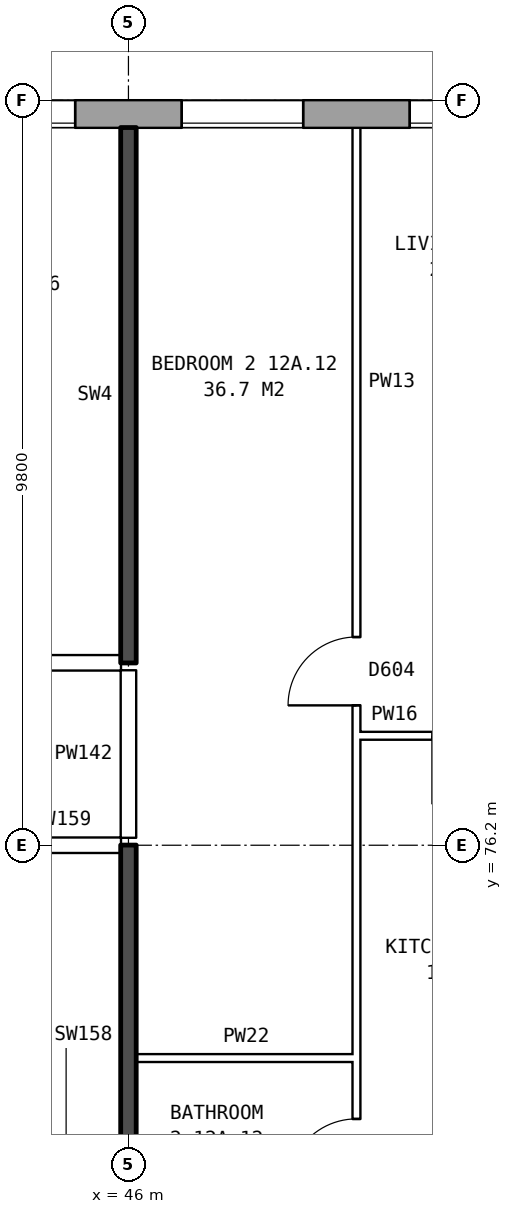
"""IFC4 building model, lengths in metres.
Left out: names, types, materials, properties, quantities, classifications, styles, units other than length and angle.
Written with IfcOpenShell. Run it as: python <this file> out.ifc"""

import sys

from ifc_helpers import new_model, si_unit, direction, frame, frame_2d, origin, place, context, subcontext, project, spatial, rectangle, extrude, element, fill, save


model = new_model("IFC4")
c1 = context("Model", 3, precision=1e-05, world=origin(), true_north=direction((0.0, 1.0)))
c2 = subcontext(c1, "Body", "Model", "MODEL_VIEW")
j1 = project(units=[si_unit("LENGTHUNIT", "METRE"), si_unit("PLANEANGLEUNIT", "RADIAN")], contexts=[c1])
p1 = place(None, origin())
s1 = spatial("IfcSite", under=j1, at=p1, CompositionType="ELEMENT")
p2 = place(p1, origin())
s2 = spatial("IfcBuilding", under=s1, at=p2, CompositionType="ELEMENT")
p3 = place(p2, frame((0.0, 0.0, 47.4)))
s3 = spatial("IfcBuildingStorey", under=s2, at=p3, CompositionType="ELEMENT", Elevation=47.4)
p4 = place(p3, frame((72.925, 85.82, 0.0), z_axis=(0.0, 0.0, 1.0), x_axis=(-1.0, 0.0, 0.0)))
e1 = element("IfcWall", 1, at=p4, inside=s3, PredefinedType="STANDARD", context=c2, shape_type="SweptSolid", body=[
    extrude(rectangle(XDim=48.351, YDim=0.36, at=frame_2d((24.175, 0.0))), origin(), (0.0, 0.0, 1.0), 2.85),
])
p5 = place(p4, frame((0.625, 0.0, 0.8)))
e2 = element("IfcOpeningElement", 2, at=p5, cuts=e1, PredefinedType="OPENING", context=c2, shape_type="SweptSolid", body=[
    extrude(rectangle(XDim=1.6, YDim=1.8, at=frame_2d((0.8, 0.9))), frame((0.0, 0.19, 0.0), z_axis=(0.0, -1.0, 0.0), x_axis=(1.0, 0.0, 0.0)), (0.0, 0.0, 1.0), 0.38),
])
p6 = place(p4, frame((3.125, 0.0, 1.7)))
e3 = element("IfcOpeningElement", 3, at=p6, cuts=e1, PredefinedType="OPENING", context=c2, shape_type="SweptSolid", body=[
    extrude(rectangle(XDim=0.6, YDim=0.9, at=frame_2d((0.3, 0.45))), frame((0.0, 0.19, 0.0), z_axis=(0.0, -1.0, 0.0), x_axis=(1.0, 0.0, 0.0)), (0.0, 0.0, 1.0), 0.38),
])
p7 = place(p4, frame((6.625, 0.0, 0.8)))
e4 = element("IfcOpeningElement", 4, at=p7, cuts=e1, PredefinedType="OPENING", context=c2, shape_type="SweptSolid", body=[
    extrude(rectangle(XDim=1.6, YDim=1.8, at=frame_2d((0.8, 0.9))), frame((0.0, 0.19, 0.0), z_axis=(0.0, -1.0, 0.0), x_axis=(1.0, 0.0, 0.0)), (0.0, 0.0, 1.0), 0.38),
])
p8 = place(p4, frame((9.625, 0.0, 0.8)))
e5 = element("IfcOpeningElement", 5, at=p8, cuts=e1, PredefinedType="OPENING", context=c2, shape_type="SweptSolid", body=[
    extrude(rectangle(XDim=1.6, YDim=1.8, at=frame_2d((0.8, 0.9))), frame((0.0, 0.19, 0.0), z_axis=(0.0, -1.0, 0.0), x_axis=(1.0, 0.0, 0.0)), (0.0, 0.0, 1.0), 0.38),
])
p9 = place(p4, frame((12.625, 0.0, 0.8)))
e6 = element("IfcOpeningElement", 6, at=p9, cuts=e1, PredefinedType="OPENING", context=c2, shape_type="SweptSolid", body=[
    extrude(rectangle(XDim=1.6, YDim=1.8, at=frame_2d((0.8, 0.9))), frame((0.0, 0.19, 0.0), z_axis=(0.0, -1.0, 0.0), x_axis=(1.0, 0.0, 0.0)), (0.0, 0.0, 1.0), 0.38),
])
p10 = place(p4, frame((15.625, 0.0, 0.8)))
e7 = element("IfcOpeningElement", 7, at=p10, cuts=e1, PredefinedType="OPENING", context=c2, shape_type="SweptSolid", body=[
    extrude(rectangle(XDim=1.6, YDim=1.8, at=frame_2d((0.8, 0.9))), frame((0.0, 0.19, 0.0), z_axis=(0.0, -1.0, 0.0), x_axis=(1.0, 0.0, 0.0)), (0.0, 0.0, 1.0), 0.38),
])
p11 = place(p4, frame((18.625, 0.0, 0.8)))
e8 = element("IfcOpeningElement", 8, at=p11, cuts=e1, PredefinedType="OPENING", context=c2, shape_type="SweptSolid", body=[
    extrude(rectangle(XDim=1.6, YDim=1.8, at=frame_2d((0.8, 0.9))), frame((0.0, 0.19, 0.0), z_axis=(0.0, -1.0, 0.0), x_axis=(1.0, 0.0, 0.0)), (0.0, 0.0, 1.0), 0.38),
])
p12 = place(p4, frame((21.625, 0.0, 0.8)))
e9 = element("IfcOpeningElement", 9, at=p12, cuts=e1, PredefinedType="OPENING", context=c2, shape_type="SweptSolid", body=[
    extrude(rectangle(XDim=1.6, YDim=1.8, at=frame_2d((0.8, 0.9))), frame((0.0, 0.19, 0.0), z_axis=(0.0, -1.0, 0.0), x_axis=(1.0, 0.0, 0.0)), (0.0, 0.0, 1.0), 0.38),
])
p13 = place(p4, frame((24.625, 0.0, 0.8)))
e10 = element("IfcOpeningElement", 10, at=p13, cuts=e1, PredefinedType="OPENING", context=c2, shape_type="SweptSolid", body=[
    extrude(rectangle(XDim=1.6, YDim=1.8, at=frame_2d((0.8, 0.9))), frame((0.0, 0.19, 0.0), z_axis=(0.0, -1.0, 0.0), x_axis=(1.0, 0.0, 0.0)), (0.0, 0.0, 1.0), 0.38),
])
p14 = place(p4, frame((27.625, 0.0, 0.8)))
e11 = element("IfcOpeningElement", 11, at=p14, cuts=e1, PredefinedType="OPENING", context=c2, shape_type="SweptSolid", body=[
    extrude(rectangle(XDim=1.6, YDim=1.8, at=frame_2d((0.8, 0.9))), frame((0.0, 0.19, 0.0), z_axis=(0.0, -1.0, 0.0), x_axis=(1.0, 0.0, 0.0)), (0.0, 0.0, 1.0), 0.38),
])
p15 = place(p4, frame((30.625, 0.0, 0.8)))
e12 = element("IfcOpeningElement", 12, at=p15, cuts=e1, PredefinedType="OPENING", context=c2, shape_type="SweptSolid", body=[
    extrude(rectangle(XDim=1.6, YDim=1.8, at=frame_2d((0.8, 0.9))), frame((0.0, 0.19, 0.0), z_axis=(0.0, -1.0, 0.0), x_axis=(1.0, 0.0, 0.0)), (0.0, 0.0, 1.0), 0.38),
])
p16 = place(p4, frame((33.625, 0.0, 0.8)))
e13 = element("IfcOpeningElement", 13, at=p16, cuts=e1, PredefinedType="OPENING", context=c2, shape_type="SweptSolid", body=[
    extrude(rectangle(XDim=1.6, YDim=1.8, at=frame_2d((0.8, 0.9))), frame((0.0, 0.19, 0.0), z_axis=(0.0, -1.0, 0.0), x_axis=(1.0, 0.0, 0.0)), (0.0, 0.0, 1.0), 0.38),
])
p17 = place(p4, frame((36.625, 0.0, 0.8)))
e14 = element("IfcOpeningElement", 14, at=p17, cuts=e1, PredefinedType="OPENING", context=c2, shape_type="SweptSolid", body=[
    extrude(rectangle(XDim=1.6, YDim=1.8, at=frame_2d((0.8, 0.9))), frame((0.0, 0.19, 0.0), z_axis=(0.0, -1.0, 0.0), x_axis=(1.0, 0.0, 0.0)), (0.0, 0.0, 1.0), 0.38),
])
p18 = place(p4, frame((39.625, 0.0, 0.8)))
e15 = element("IfcOpeningElement", 15, at=p18, cuts=e1, PredefinedType="OPENING", context=c2, shape_type="SweptSolid", body=[
    extrude(rectangle(XDim=1.6, YDim=1.8, at=frame_2d((0.8, 0.9))), frame((0.0, 0.19, 0.0), z_axis=(0.0, -1.0, 0.0), x_axis=(1.0, 0.0, 0.0)), (0.0, 0.0, 1.0), 0.38),
])
p19 = place(p4, frame((41.525, 0.0, 0.8)))
e16 = element("IfcOpeningElement", 16, at=p19, cuts=e1, PredefinedType="OPENING", context=c2, shape_type="SweptSolid", body=[
    extrude(rectangle(XDim=1.2, YDim=1.2, at=frame_2d((0.6, 0.6))), frame((0.0, 0.19, 0.0), z_axis=(0.0, -1.0, 0.0), x_axis=(1.0, 0.0, 0.0)), (0.0, 0.0, 1.0), 0.38),
])
p20 = place(p4, frame((45.625, 0.0, 0.8)))
e17 = element("IfcOpeningElement", 17, at=p20, cuts=e1, PredefinedType="OPENING", context=c2, shape_type="SweptSolid", body=[
    extrude(rectangle(XDim=1.6, YDim=1.8, at=frame_2d((0.8, 0.9))), frame((0.0, 0.19, 0.0), z_axis=(0.0, -1.0, 0.0), x_axis=(1.0, 0.0, 0.0)), (0.0, 0.0, 1.0), 0.38),
])
p21 = place(p4, frame((5.225, 0.0, 0.8)))
e18 = element("IfcOpeningElement", 18, at=p21, cuts=e1, PredefinedType="OPENING", context=c2, shape_type="SweptSolid", body=[
    extrude(rectangle(XDim=1.0, YDim=0.9, at=frame_2d((0.5, 0.45))), frame((0.0, 0.19, 0.0), z_axis=(0.0, -1.0, 0.0), x_axis=(1.0, 0.0, 0.0)), (0.0, 0.0, 1.0), 0.38),
])
p22 = place(p3, frame((46.1, 73.4, 0.0), z_axis=(0.0, 0.0, 1.0), x_axis=(1.0, 0.0, 0.0)))
e19 = element("IfcWall", 19, at=p22, inside=s3, PredefinedType="PARTITIONING", context=c2, shape_type="SweptSolid", body=[
    extrude(rectangle(XDim=2.9, YDim=0.1, at=frame_2d((1.45, 0.0))), origin(), (0.0, 0.0, 1.0), 2.85),
])
p23 = place(p3, frame((44.36, 76.2, 0.0), z_axis=(0.0, 0.0, 1.0), x_axis=(1.0, 0.0, 0.0)))
e20 = element("IfcWall", 20, at=p23, inside=s3, PredefinedType="PARTITIONING", context=c2, shape_type="SweptSolid", body=[
    extrude(rectangle(XDim=1.54, YDim=0.2, at=frame_2d((0.77, 0.0))), origin(), (0.0, 0.0, 1.0), 2.85),
])
p24 = place(p3, frame((49.0, 77.64, 0.0), z_axis=(0.0, 0.0, 1.0), x_axis=(1.0, 0.0, 0.0)))
e21 = element("IfcWall", 21, at=p24, inside=s3, PredefinedType="PARTITIONING", context=c2, shape_type="SweptSolid", body=[
    extrude(rectangle(XDim=2.9, YDim=0.1, at=frame_2d((1.45, 0.0))), origin(), (0.0, 0.0, 1.0), 2.85),
])
p25 = place(p24, frame((1.0, 0.0, 0.0)))
e22 = element("IfcOpeningElement", 22, at=p25, cuts=e21, PredefinedType="OPENING", context=c2, shape_type="SweptSolid", body=[
    extrude(rectangle(XDim=0.9, YDim=2.1, at=frame_2d((0.45, 1.05))), frame((0.0, 0.06, 0.0), z_axis=(0.0, -1.0, 0.0), x_axis=(1.0, 0.0, 0.0)), (0.0, 0.0, 1.0), 0.12),
])
p26 = place(p3, frame((21.86, 78.6, 0.0), z_axis=(0.0, 0.0, 1.0), x_axis=(1.0, 0.0, 0.0)))
e23 = element("IfcWall", 23, at=p26, inside=s3, PredefinedType="PARTITIONING", context=c2, shape_type="SweptSolid", body=[
    extrude(rectangle(XDim=24.04, YDim=0.2, at=frame_2d((12.02, 0.0))), origin(), (0.0, 0.0, 1.0), 2.85),
])
p27 = place(p26, frame((20.59, 0.0, 0.0)))
e24 = element("IfcOpeningElement", 24, at=p27, cuts=e23, PredefinedType="OPENING", context=c2, shape_type="SweptSolid", body=[
    extrude(rectangle(XDim=1.0, YDim=2.1, at=frame_2d((0.5, 1.05))), frame((0.0, 0.11, 0.0), z_axis=(0.0, -1.0, 0.0), x_axis=(1.0, 0.0, 0.0)), (0.0, 0.0, 1.0), 0.22),
])
p28 = place(p26, frame((8.64, 0.0, 0.0)))
e25 = element("IfcOpeningElement", 25, at=p28, cuts=e23, PredefinedType="OPENING", context=c2, shape_type="SweptSolid", body=[
    extrude(rectangle(XDim=1.0, YDim=2.1, at=frame_2d((0.5, 1.05))), frame((0.0, 0.11, 0.0), z_axis=(0.0, -1.0, 0.0), x_axis=(1.0, 0.0, 0.0)), (0.0, 0.0, 1.0), 0.22),
])
p29 = place(p26, frame((1.37, 0.0, 0.0)))
e26 = element("IfcOpeningElement", 26, at=p29, cuts=e23, PredefinedType="OPENING", context=c2, shape_type="SweptSolid", body=[
    extrude(rectangle(XDim=1.0, YDim=2.1, at=frame_2d((0.5, 1.05))), frame((0.0, 0.11, 0.0), z_axis=(0.0, -1.0, 0.0), x_axis=(1.0, 0.0, 0.0)), (0.0, 0.0, 1.0), 0.22),
])
p30 = place(p3, frame((46.0, 71.2, 0.0), z_axis=(0.0, 0.0, 1.0), x_axis=(0.0, 1.0, 0.0)))
e27 = element("IfcWall", 27, at=p30, inside=s3, PredefinedType="SOLIDWALL", context=c2, shape_type="SweptSolid", body=[
    extrude(rectangle(XDim=5.0, YDim=0.2, at=frame_2d((2.5, 0.0))), origin(), (0.0, 0.0, 1.0), 2.85),
])
p31 = place(p3, frame((46.0, 76.3, 0.0), z_axis=(0.0, 0.0, 1.0), x_axis=(0.0, 1.0, 0.0)))
e28 = element("IfcWall", 28, at=p31, inside=s3, PredefinedType="PARTITIONING", context=c2, shape_type="SweptSolid", body=[
    extrude(rectangle(XDim=2.2, YDim=0.2, at=frame_2d((1.1, 0.0))), origin(), (0.0, 0.0, 1.0), 2.85),
])
p32 = place(p3, frame((46.0, 78.6, 0.0), z_axis=(0.0, 0.0, 1.0), x_axis=(0.0, 1.0, 0.0)))
e29 = element("IfcWall", 29, at=p32, inside=s3, PredefinedType="SOLIDWALL", context=c2, shape_type="SweptSolid", body=[
    extrude(rectangle(XDim=7.04, YDim=0.2, at=frame_2d((3.52, 0.0))), origin(), (0.0, 0.0, 1.0), 2.85),
])
p33 = place(p3, frame((49.0, 71.3, 0.0), z_axis=(0.0, 0.0, 1.0), x_axis=(0.0, 1.0, 0.0)))
e30 = element("IfcWall", 30, at=p33, inside=s3, PredefinedType="PARTITIONING", context=c2, shape_type="SweptSolid", body=[
    extrude(rectangle(XDim=14.34, YDim=0.1, at=frame_2d((7.17, 0.0))), origin(), (0.0, 0.0, 1.0), 2.85),
])
p34 = place(p33, frame((6.74, 0.0, 0.0)))
e31 = element("IfcOpeningElement", 31, at=p34, cuts=e30, PredefinedType="OPENING", context=c2, shape_type="SweptSolid", body=[
    extrude(rectangle(XDim=0.9, YDim=2.1, at=frame_2d((0.45, 1.05))), frame((0.0, 0.06, 0.0), z_axis=(0.0, -1.0, 0.0), x_axis=(1.0, 0.0, 0.0)), (0.0, 0.0, 1.0), 0.12),
])
p35 = place(p33, frame((0.4, 0.0, 0.0)))
e32 = element("IfcOpeningElement", 32, at=p35, cuts=e30, PredefinedType="OPENING", context=c2, shape_type="SweptSolid", body=[
    extrude(rectangle(XDim=0.9, YDim=2.1, at=frame_2d((0.45, 1.05))), frame((0.0, 0.06, 0.0), z_axis=(0.0, -1.0, 0.0), x_axis=(1.0, 0.0, 0.0)), (0.0, 0.0, 1.0), 0.12),
])
p36 = place(p12, origin())
e33 = element("IfcWindow", 33, at=p36, inside=s3, PartitioningType="SINGLE_PANEL", PredefinedType="WINDOW", context=c2, shape_type="SweptSolid", body=[
    extrude(rectangle(XDim=1.6, YDim=1.8, at=frame_2d((0.8, 0.9))), frame((0.0, 0.15, 0.0), z_axis=(0.0, -1.0, 0.0), x_axis=(1.0, 0.0, 0.0)), (0.0, 0.0, 1.0), 0.06),
])
fill(e9, e33)
p37 = place(p13, origin())
e34 = element("IfcWindow", 34, at=p37, inside=s3, PartitioningType="SINGLE_PANEL", PredefinedType="WINDOW", context=c2, shape_type="SweptSolid", body=[
    extrude(rectangle(XDim=1.6, YDim=1.8, at=frame_2d((0.8, 0.9))), frame((0.0, 0.15, 0.0), z_axis=(0.0, -1.0, 0.0), x_axis=(1.0, 0.0, 0.0)), (0.0, 0.0, 1.0), 0.06),
])
fill(e10, e34)
p38 = place(p14, origin())
e35 = element("IfcWindow", 35, at=p38, inside=s3, PartitioningType="SINGLE_PANEL", PredefinedType="WINDOW", context=c2, shape_type="SweptSolid", body=[
    extrude(rectangle(XDim=1.6, YDim=1.8, at=frame_2d((0.8, 0.9))), frame((0.0, 0.15, 0.0), z_axis=(0.0, -1.0, 0.0), x_axis=(1.0, 0.0, 0.0)), (0.0, 0.0, 1.0), 0.06),
])
fill(e11, e35)
p39 = place(p34, origin())
e36 = element("IfcDoor", 36, at=p39, inside=s3, OperationType="SINGLE_SWING_LEFT", PredefinedType="DOOR", context=c2, shape_type="SweptSolid", body=[
    extrude(rectangle(XDim=0.9, YDim=2.1, at=frame_2d((0.45, 1.05))), frame((0.0, 0.025, 0.0), z_axis=(0.0, -1.0, 0.0), x_axis=(1.0, 0.0, 0.0)), (0.0, 0.0, 1.0), 0.05),
])
fill(e31, e36)
p40 = place(p35, origin())
e37 = element("IfcDoor", 37, at=p40, inside=s3, OperationType="SINGLE_SWING_LEFT", PredefinedType="DOOR", context=c2, shape_type="SweptSolid", body=[
    extrude(rectangle(XDim=0.9, YDim=2.1, at=frame_2d((0.45, 1.05))), frame((0.0, 0.025, 0.0), z_axis=(0.0, -1.0, 0.0), x_axis=(1.0, 0.0, 0.0)), (0.0, 0.0, 1.0), 0.05),
])
fill(e32, e37)
save(model, sys.argv[1])
